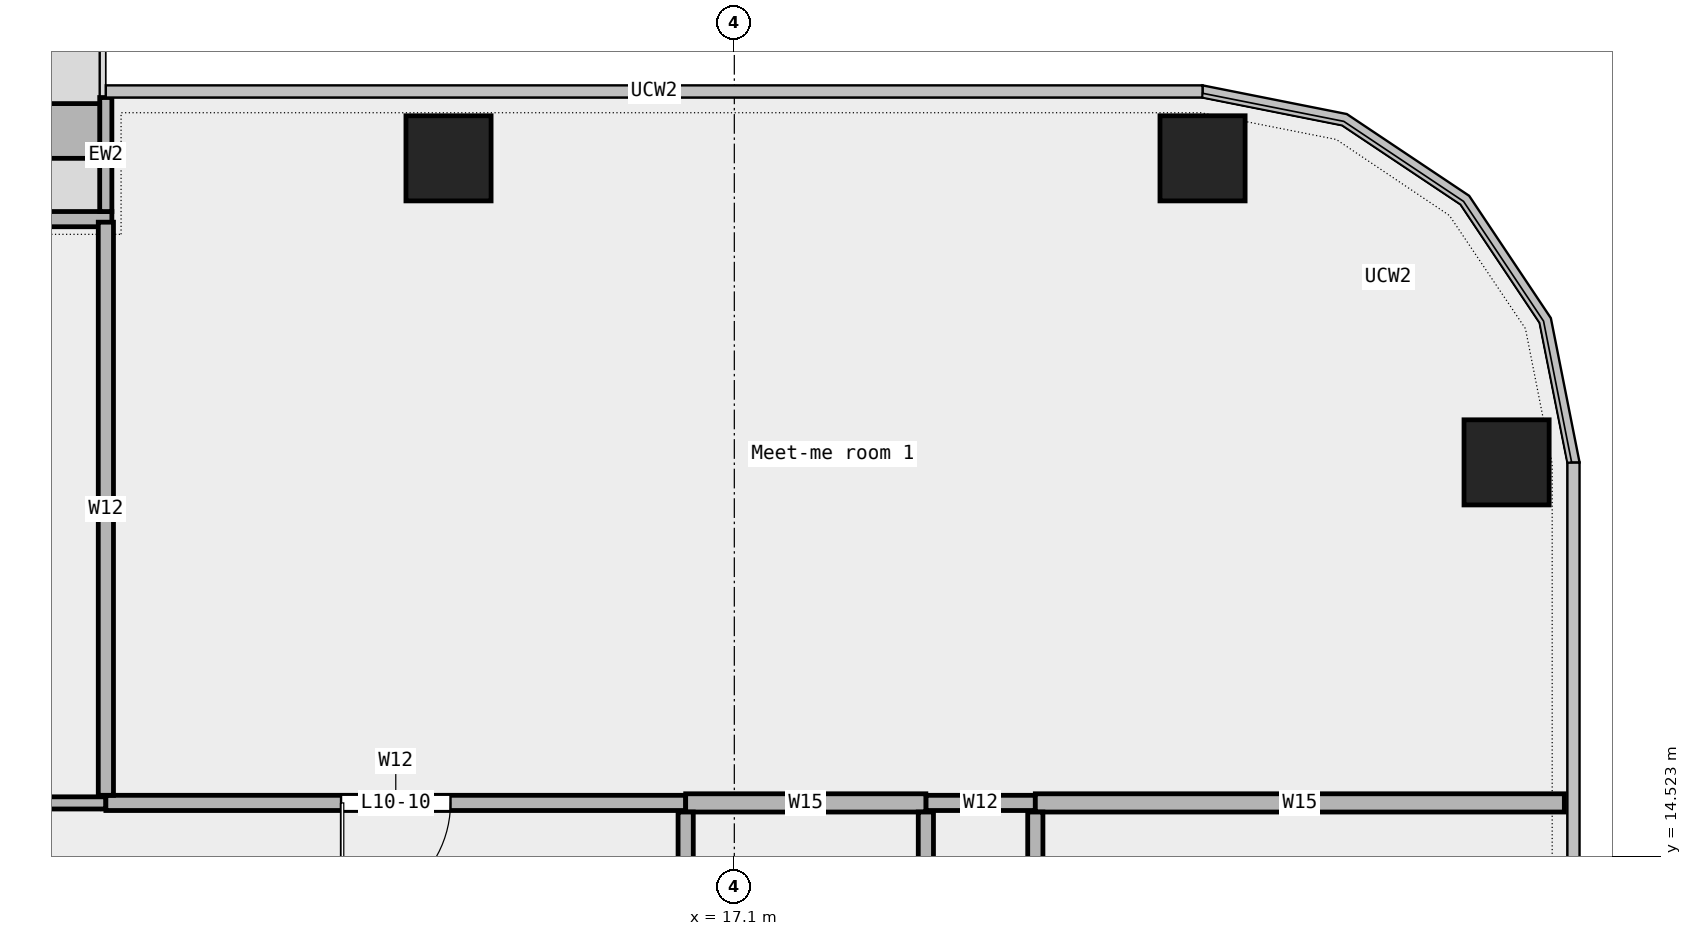
"""IFC4 building model, lengths in metres.
Left out: names, types, materials, properties, quantities, classifications, styles, units other than length and angle.
Written with IfcOpenShell. Run it as: python <this file> out.ifc"""

import sys

from ifc_helpers import new_model, si_unit, direction, frame, frame_2d, origin, origin_2d, place, context, subcontext, project, spatial, rectangle, extrude, element, fill, save


model = new_model("IFC4")
c1 = context("Model", 3, precision=1e-05, world=origin(), true_north=direction((0.0, 1.0)))
c2 = subcontext(c1, "Body", "Model", "MODEL_VIEW")
j1 = project(units=[si_unit("LENGTHUNIT", "METRE"), si_unit("PLANEANGLEUNIT", "RADIAN")], contexts=[c1])
p1 = place(None, origin())
s1 = spatial("IfcSite", under=j1, at=p1, CompositionType="ELEMENT")
p2 = place(p1, origin())
s2 = spatial("IfcBuilding", under=s1, at=p2, CompositionType="ELEMENT")
p3 = place(p2, frame((0.0, 0.0, 55.0)))
s3 = spatial("IfcBuildingStorey", under=s2, at=p3, CompositionType="ELEMENT", Elevation=55.0)
for number, where, z_axis, x_axis in (
    (1, (29.8, 21.0, 0.0), (0.0, 0.0, 1.0), (1.0, 0.0, 0.0)),
    (2, (24.8, 26.0, 0.0), (0.0, 0.0, 1.0), (1.0, 0.0, 0.0)),
    (3, (12.4, 26.0, 0.0), (0.0, 0.0, 1.0), (1.0, 0.0, 0.0)),
):
    element("IfcColumn", number, at=place(p3, frame(where, z_axis=z_axis, x_axis=x_axis)), inside=s3, PredefinedType="COLUMN", context=c2, shape_type="SweptSolid", body=[
        extrude(rectangle(XDim=1.4, YDim=1.4, at=origin_2d()), origin(), (0.0, 0.0, 1.0), 4.35),
    ])
p4 = place(p3, frame((6.864, 25.0, 0.0), z_axis=(0.0, 0.0, 1.0), x_axis=(-1.0, 0.0, 0.0)))
e4 = element("IfcWall", 4, at=p4, inside=s3, PredefinedType="STANDARD", context=c2, shape_type="SweptSolid", body=[
    extrude(rectangle(XDim=13.727, YDim=0.25, at=frame_2d((6.864, 0.0))), origin(), (0.0, 0.0, 1.0), 4.35),
])
p5 = place(p4, frame((1.75, 0.0, 0.45)))
e5 = element("IfcOpeningElement", 5, at=p5, cuts=e4, PredefinedType="OPENING", context=c2, shape_type="SweptSolid", body=[
    extrude(rectangle(XDim=1.5, YDim=3.0, at=frame_2d((0.75, 1.5))), frame((0.0, 0.137, 0.0), z_axis=(0.0, -1.0, 0.0), x_axis=(1.0, 0.0, 0.0)), (0.0, 0.0, 1.0), 0.274),
])
p6 = place(p4, frame((4.0, 0.0, 0.0)))
e6 = element("IfcOpeningElement", 6, at=p6, cuts=e4, PredefinedType="OPENING", context=c2, shape_type="SweptSolid", body=[
    extrude(rectangle(XDim=1.8, YDim=2.4, at=frame_2d((0.9, 1.2))), frame((0.0, 0.137, 0.0), z_axis=(0.0, -1.0, 0.0), x_axis=(1.0, 0.0, 0.0)), (0.0, 0.0, 1.0), 0.274),
])
p7 = place(p4, frame((10.5, 0.0, 0.45)))
e7 = element("IfcOpeningElement", 7, at=p7, cuts=e4, PredefinedType="OPENING", context=c2, shape_type="SweptSolid", body=[
    extrude(rectangle(XDim=1.5, YDim=3.0, at=frame_2d((0.75, 1.5))), frame((0.0, 0.137, 0.0), z_axis=(0.0, -1.0, 0.0), x_axis=(1.0, 0.0, 0.0)), (0.0, 0.0, 1.0), 0.274),
])
p8 = place(p3, frame((6.764, 27.0, 0.0), z_axis=(0.0, 0.0, 1.0), x_axis=(0.0, -1.0, 0.0)))
e8 = element("IfcWall", 8, at=p8, inside=s3, PredefinedType="STANDARD", context=c2, shape_type="SweptSolid", body=[
    extrude(rectangle(XDim=1.875, YDim=0.2, at=frame_2d((0.938, 0.0))), origin(), (0.0, 0.0, 1.0), 4.35),
])
p9 = place(p3, frame((6.664, 26.45, 0.0), z_axis=(0.0, 0.0, 1.0), x_axis=(-1.0, 0.0, 0.0)))
e9 = element("IfcWall", 9, at=p9, inside=s3, PredefinedType="STANDARD", context=c2, shape_type="SweptSolid", body=[
    extrude(rectangle(XDim=3.6, YDim=0.9, at=frame_2d((1.8, 0.0))), origin(), (0.0, 0.0, 1.0), 0.7),
])
p10 = place(p3, frame((-6.765, 15.4, 0.0), z_axis=(0.0, 0.0, 1.0), x_axis=(1.0, 0.0, 0.0)))
e10 = element("IfcWall", 10, at=p10, inside=s3, PredefinedType="PARTITIONING", context=c2, shape_type="SweptSolid", body=[
    extrude(rectangle(XDim=13.53, YDim=0.2, at=frame_2d((6.765, 0.0))), origin(), (0.0, 0.0, 1.0), 4.35),
])
p11 = place(p10, frame((6.015, 0.0, 0.0)))
e11 = element("IfcOpeningElement", 11, at=p11, cuts=e10, PredefinedType="OPENING", context=c2, shape_type="SweptSolid", body=[
    extrude(rectangle(XDim=1.5, YDim=2.1, at=frame_2d((0.75, 1.05))), frame((0.0, 0.112, 0.0), z_axis=(0.0, -1.0, 0.0), x_axis=(1.0, 0.0, 0.0)), (0.0, 0.0, 1.0), 0.224),
])
p12 = place(p3, frame((6.765, 15.4, 0.0), z_axis=(0.0, 0.0, 1.0), x_axis=(1.0, 0.0, 0.0)))
e12 = element("IfcWall", 12, at=p12, inside=s3, PredefinedType="PARTITIONING", context=c2, shape_type="SweptSolid", body=[
    extrude(rectangle(XDim=9.535, YDim=0.25, at=frame_2d((4.768, 0.0))), origin(), (0.0, 0.0, 1.0), 4.35),
])
p13 = place(p12, frame((3.867, 0.0, 0.0)))
e13 = element("IfcOpeningElement", 13, at=p13, cuts=e12, PredefinedType="OPENING", context=c2, shape_type="SweptSolid", body=[
    extrude(rectangle(XDim=1.8, YDim=2.1, at=frame_2d((0.9, 1.05))), frame((0.0, 0.137, 0.0), z_axis=(0.0, -1.0, 0.0), x_axis=(1.0, 0.0, 0.0)), (0.0, 0.0, 1.0), 0.274),
])
p14 = place(p3, frame((20.25, 15.4, 0.0), z_axis=(0.0, 0.0, 1.0), x_axis=(1.0, 0.0, 0.0)))
e14 = element("IfcWall", 14, at=p14, inside=s3, PredefinedType="PARTITIONING", context=c2, shape_type="SweptSolid", body=[
    extrude(rectangle(XDim=1.8, YDim=0.25, at=frame_2d((0.9, 0.0))), origin(), (0.0, 0.0, 1.0), 4.35),
])
p15 = place(p3, frame((16.3, 15.4, 0.0), z_axis=(0.0, 0.0, 1.0), x_axis=(1.0, 0.0, 0.0)))
e15 = element("IfcWall", 15, at=p15, inside=s3, PredefinedType="PARTITIONING", context=c2, shape_type="SweptSolid", body=[
    extrude(rectangle(XDim=3.95, YDim=0.3, at=frame_2d((1.975, 0.0))), origin(), (0.0, 0.0, 1.0), 4.35),
])
p16 = place(p3, frame((22.05, 15.4, 0.0), z_axis=(0.0, 0.0, 1.0), x_axis=(1.0, 0.0, 0.0)))
e16 = element("IfcWall", 16, at=p16, inside=s3, PredefinedType="PARTITIONING", context=c2, shape_type="SweptSolid", body=[
    extrude(rectangle(XDim=8.7, YDim=0.3, at=frame_2d((4.35, 0.0))), origin(), (0.0, 0.0, 1.0), 4.35),
])
p17 = place(p3, frame((6.765, 15.525, 0.0), z_axis=(0.0, 0.0, 1.0), x_axis=(0.0, 1.0, 0.0)))
e17 = element("IfcWall", 17, at=p17, inside=s3, PredefinedType="PARTITIONING", context=c2, shape_type="SweptSolid", body=[
    extrude(rectangle(XDim=9.425, YDim=0.25, at=frame_2d((4.712, 0.0))), origin(), (0.0, 0.0, 1.0), 4.35),
])
p18 = place(p3, frame((16.3, 11.8, 0.0), z_axis=(0.0, 0.0, 1.0), x_axis=(0.0, 1.0, 0.0)))
e18 = element("IfcWall", 18, at=p18, inside=s3, PredefinedType="PARTITIONING", context=c2, shape_type="SweptSolid", body=[
    extrude(rectangle(XDim=3.45, YDim=0.25, at=frame_2d((1.725, 0.0))), origin(), (0.0, 0.0, 1.0), 4.35),
])
p19 = place(p3, frame((20.25, 9.85, 0.0), z_axis=(0.0, 0.0, 1.0), x_axis=(0.0, 1.0, 0.0)))
e19 = element("IfcWall", 19, at=p19, inside=s3, PredefinedType="PARTITIONING", context=c2, shape_type="SweptSolid", body=[
    extrude(rectangle(XDim=5.4, YDim=0.25, at=frame_2d((2.7, 0.0))), origin(), (0.0, 0.0, 1.0), 4.35),
])
p20 = place(p19, frame((2.25, 0.0, 0.0)))
e20 = element("IfcOpeningElement", 20, at=p20, cuts=e19, PredefinedType="OPENING", context=c2, shape_type="SweptSolid", body=[
    extrude(rectangle(XDim=0.9, YDim=2.1, at=frame_2d((0.45, 1.05))), frame((0.0, 0.137, 0.0), z_axis=(0.0, -1.0, 0.0), x_axis=(1.0, 0.0, 0.0)), (0.0, 0.0, 1.0), 0.274),
])
p21 = place(p3, frame((22.05, 2.46, 0.0), z_axis=(0.0, 0.0, 1.0), x_axis=(0.0, 1.0, 0.0)))
e21 = element("IfcWall", 21, at=p21, inside=s3, PredefinedType="PARTITIONING", context=c2, shape_type="SweptSolid", body=[
    extrude(rectangle(XDim=12.79, YDim=0.25, at=frame_2d((6.395, 0.0))), origin(), (0.0, 0.0, 1.0), 4.35),
])
p22 = place(p21, frame((2.37, 0.0, 0.0)))
e22 = element("IfcOpeningElement", 22, at=p22, cuts=e21, PredefinedType="OPENING", context=c2, shape_type="SweptSolid", body=[
    extrude(rectangle(XDim=1.2, YDim=2.1, at=frame_2d((0.6, 1.05))), frame((0.0, 0.137, 0.0), z_axis=(0.0, -1.0, 0.0), x_axis=(1.0, 0.0, 0.0)), (0.0, 0.0, 1.0), 0.274),
])
p23 = place(p21, frame((8.765, 0.0, 0.0)))
e23 = element("IfcOpeningElement", 23, at=p23, cuts=e21, PredefinedType="OPENING", context=c2, shape_type="SweptSolid", body=[
    extrude(rectangle(XDim=1.2, YDim=2.1, at=frame_2d((0.6, 1.05))), frame((0.0, 0.137, 0.0), z_axis=(0.0, -1.0, 0.0), x_axis=(1.0, 0.0, 0.0)), (0.0, 0.0, 1.0), 0.274),
])
p24 = place(p13, origin())
e24 = element("IfcDoor", 24, at=p24, inside=s3, OperationType="DOUBLE_DOOR_SINGLE_SWING", PredefinedType="DOOR", context=c2, shape_type="SweptSolid", body=[
    extrude(rectangle(XDim=1.8, YDim=2.1, at=frame_2d((0.9, 1.05))), frame((0.0, 0.025, 0.0), z_axis=(0.0, -1.0, 0.0), x_axis=(1.0, 0.0, 0.0)), (0.0, 0.0, 1.0), 0.05),
])
fill(e13, e24)
save(model, sys.argv[1])
